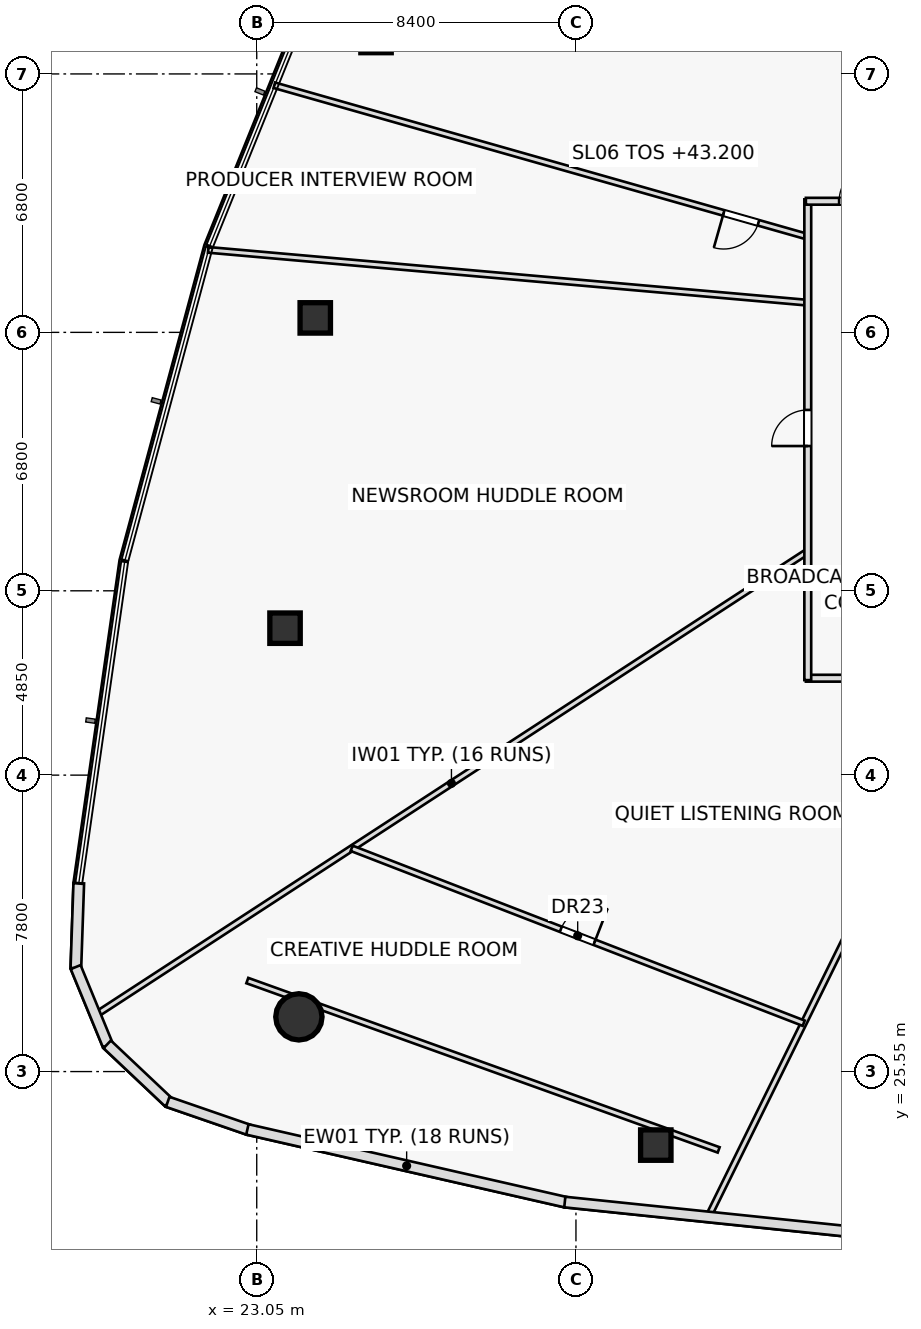
"""IFC4 building model, lengths in metres.
Left out: names, types, materials, properties, quantities, classifications, styles, units other than length and angle.
Written with IfcOpenShell. Run it as: python <this file> out.ifc"""

import sys

from ifc_helpers import new_model, si_unit, direction, frame, frame_2d, origin, origin_2d, place, context, subcontext, project, spatial, rectangle, hollow_rectangle, hollow_circle, extrude, element, fill, save


model = new_model("IFC4")
c1 = context("Model", 3, precision=1e-05, world=origin(), true_north=direction((0.0, 1.0)))
c2 = subcontext(c1, "Body", "Model", "MODEL_VIEW")
j1 = project(units=[si_unit("LENGTHUNIT", "METRE"), si_unit("PLANEANGLEUNIT", "RADIAN")], contexts=[c1])
p1 = place(None, origin())
s1 = spatial("IfcSite", under=j1, at=p1, CompositionType="ELEMENT")
p2 = place(p1, origin())
s2 = spatial("IfcBuilding", under=s1, at=p2, CompositionType="ELEMENT")
p3 = place(p2, frame((0.0, 0.0, 43.2)))
s3 = spatial("IfcBuildingStorey", under=s2, at=p3, CompositionType="ELEMENT", Elevation=43.2)
for number, where, z_axis, x_axis in (
    (1, (26.189, 52.758, 0.0), (0.0, 0.0, 1.0), (1.0, 0.0, 0.0)),
    (2, (24.59, 45.381, 0.0), (0.0, 0.0, 1.0), (1.0, 0.0, 0.0)),
    (3, (23.795, 37.216, 0.0), (0.0, 0.0, 1.0), (1.0, 0.0, 0.0)),
):
    element("IfcColumn", number, at=place(p3, frame(where, z_axis=z_axis, x_axis=x_axis)), inside=s3, PredefinedType="COLUMN", context=c2, shape_type="SweptSolid", body=[
        extrude(hollow_rectangle(XDim=0.8, YDim=0.8, WallThickness=0.045, at=origin_2d()), origin(), (0.0, 0.0, 1.0), 3.6),
    ])
p4 = place(p3, frame((24.159, 26.99, 0.0), z_axis=(0.0, 0.0, 1.0), x_axis=(1.0, 0.0, 0.0)))
e4 = element("IfcColumn", 4, at=p4, inside=s3, PredefinedType="COLUMN", context=c2, shape_type="SweptSolid", body=[
    extrude(hollow_circle(Radius=0.61, WallThickness=0.05, at=origin_2d()), origin(), (0.0, 0.0, 1.0), 3.6),
])
p5 = place(p3, frame((33.551, 23.615, 0.0), z_axis=(0.0, 0.0, 1.0), x_axis=(1.0, 0.0, 0.0)))
e5 = element("IfcColumn", 5, at=p5, inside=s3, PredefinedType="COLUMN", context=c2, shape_type="SweptSolid", body=[
    extrude(hollow_rectangle(XDim=0.8, YDim=0.8, WallThickness=0.045, at=origin_2d()), origin(), (0.0, 0.0, 1.0), 3.6),
])
p6 = place(p3, frame((22.802, 27.945, 0.0), z_axis=(0.0, 0.0, 1.0), x_axis=(0.941102349209, -0.338121824662, 0.0)))
e6 = element("IfcWall", 6, at=p6, inside=s3, PredefinedType="PARTITIONING", context=c2, shape_type="SweptSolid", body=[
    extrude(rectangle(XDim=13.18, YDim=0.15, at=frame_2d((6.59, 0.0))), origin(), (0.0, 0.0, 1.0), 2.925),
])
p7 = place(p3, frame((37.55, 47.514, 0.0), z_axis=(0.0, 0.0, 1.0), x_axis=(-0.961932608726, 0.273286765632, 0.0)))
e7 = element("IfcWall", 7, at=p7, inside=s3, PredefinedType="PARTITIONING", context=c2, shape_type="SweptSolid", body=[
    extrude(rectangle(XDim=14.593, YDim=0.15, at=frame_2d((7.296, 0.0))), origin(), (0.0, 0.0, 1.0), 2.925),
])
p8 = place(p7, frame((1.35, 0.0, 0.0)))
e8 = element("IfcOpeningElement", 8, at=p8, cuts=e7, PredefinedType="OPENING", context=c2, shape_type="SweptSolid", body=[
    extrude(rectangle(XDim=0.95, YDim=2.05, at=frame_2d((0.475, 1.025))), frame((0.0, 0.085, 0.0), z_axis=(0.0, -1.0, 0.0), x_axis=(1.0, 0.0, 0.0)), (0.0, 0.0, 1.0), 0.17),
])
p9 = place(p3, frame((37.55, 45.78, 0.0), z_axis=(0.0, 0.0, 1.0), x_axis=(-0.996136872502, 0.087814185882, 0.0)))
e9 = element("IfcWall", 9, at=p9, inside=s3, PredefinedType="PARTITIONING", context=c2, shape_type="SweptSolid", body=[
    extrude(rectangle(XDim=15.839, YDim=0.15, at=frame_2d((7.919, 0.0))), origin(), (0.0, 0.0, 1.0), 2.925),
])
p10 = place(p3, frame((37.55, 39.238, 0.0), z_axis=(0.0, 0.0, 1.0), x_axis=(-0.838030337593, -0.545623637019, 0.0)))
e10 = element("IfcWall", 10, at=p10, inside=s3, PredefinedType="PARTITIONING", context=c2, shape_type="SweptSolid", body=[
    extrude(rectangle(XDim=22.377, YDim=0.15, at=frame_2d((11.188, 0.0))), origin(), (0.0, 0.0, 1.0), 2.925),
])
p11 = place(p3, frame((41.916, 35.9, 0.0), z_axis=(0.0, 0.0, 1.0), x_axis=(-0.442006147161, -0.89701202103, 0.0)))
e11 = element("IfcWall", 11, at=p11, inside=s3, PredefinedType="PARTITIONING", context=c2, shape_type="SweptSolid", body=[
    extrude(rectangle(XDim=15.813, YDim=0.15, at=frame_2d((7.907, 0.0))), origin(), (0.0, 0.0, 1.0), 2.975),
])
p12 = place(p3, frame((25.548, 31.424, 0.0), z_axis=(0.0, 0.0, 1.0), x_axis=(0.932625879007, -0.360844800166, 0.0)))
e12 = element("IfcWall", 12, at=p12, inside=s3, PredefinedType="PARTITIONING", context=c2, shape_type="SweptSolid", body=[
    extrude(rectangle(XDim=12.754, YDim=0.15, at=frame_2d((6.377, 0.0))), origin(), (0.0, 0.0, 1.0), 2.925),
])
p13 = place(p12, frame((5.902, 0.0, 0.0)))
e13 = element("IfcOpeningElement", 13, at=p13, cuts=e12, PredefinedType="OPENING", context=c2, shape_type="SweptSolid", body=[
    extrude(rectangle(XDim=0.95, YDim=2.05, at=frame_2d((0.475, 1.025))), frame((0.0, 0.085, 0.0), z_axis=(0.0, -1.0, 0.0), x_axis=(1.0, 0.0, 0.0)), (0.0, 0.0, 1.0), 0.17),
])
p14 = place(p3, frame((59.55, 35.9, 0.0), z_axis=(0.0, 0.0, 1.0), x_axis=(-1.0, 0.0, 0.0)))
e14 = element("IfcWall", 14, at=p14, inside=s3, PredefinedType="PARTITIONING", context=c2, shape_type="SweptSolid", body=[
    extrude(rectangle(XDim=22.05, YDim=0.18, at=frame_2d((11.025, 0.0))), origin(), (0.0, 0.0, 1.0), 2.925),
])
p15 = place(p14, frame((2.193, 0.0, 0.0)))
e15 = element("IfcOpeningElement", 15, at=p15, cuts=e14, PredefinedType="OPENING", context=c2, shape_type="SweptSolid", body=[
    extrude(rectangle(XDim=0.95, YDim=2.05, at=frame_2d((0.475, 1.025))), frame((0.0, 0.1, 0.0), z_axis=(0.0, -1.0, 0.0), x_axis=(1.0, 0.0, 0.0)), (0.0, 0.0, 1.0), 0.2),
])
p16 = place(p14, frame((8.49, 0.0, 0.0)))
e16 = element("IfcOpeningElement", 16, at=p16, cuts=e14, PredefinedType="OPENING", context=c2, shape_type="SweptSolid", body=[
    extrude(rectangle(XDim=0.95, YDim=2.05, at=frame_2d((0.475, 1.025))), frame((0.0, 0.1, 0.0), z_axis=(0.0, -1.0, 0.0), x_axis=(1.0, 0.0, 0.0)), (0.0, 0.0, 1.0), 0.2),
])
p17 = place(p14, frame((14.76, 0.0, 0.0)))
e17 = element("IfcOpeningElement", 17, at=p17, cuts=e14, PredefinedType="OPENING", context=c2, shape_type="SweptSolid", body=[
    extrude(rectangle(XDim=0.95, YDim=2.05, at=frame_2d((0.475, 1.025))), frame((0.0, 0.1, 0.0), z_axis=(0.0, -1.0, 0.0), x_axis=(1.0, 0.0, 0.0)), (0.0, 0.0, 1.0), 0.2),
])
p18 = place(p14, frame((19.281, 0.0, 0.0)))
e18 = element("IfcOpeningElement", 18, at=p18, cuts=e14, PredefinedType="OPENING", context=c2, shape_type="SweptSolid", body=[
    extrude(rectangle(XDim=0.95, YDim=2.05, at=frame_2d((0.475, 1.025))), frame((0.0, 0.1, 0.0), z_axis=(0.0, -1.0, 0.0), x_axis=(1.0, 0.0, 0.0)), (0.0, 0.0, 1.0), 0.2),
])
p19 = place(p3, frame((37.55, 35.85, 0.0), z_axis=(0.0, 0.0, 1.0), x_axis=(0.0, 1.0, 0.0)))
e19 = element("IfcWall", 19, at=p19, inside=s3, PredefinedType="PARTITIONING", context=c2, shape_type="SweptSolid", body=[
    extrude(rectangle(XDim=12.65, YDim=0.18, at=frame_2d((6.325, 0.0))), origin(), (0.0, 0.0, 1.0), 2.925),
])
p20 = place(p19, frame((6.159, 0.0, 0.0)))
e20 = element("IfcOpeningElement", 20, at=p20, cuts=e19, PredefinedType="OPENING", context=c2, shape_type="SweptSolid", body=[
    extrude(rectangle(XDim=0.95, YDim=2.05, at=frame_2d((0.475, 1.025))), frame((0.0, 0.1, 0.0), z_axis=(0.0, -1.0, 0.0), x_axis=(1.0, 0.0, 0.0)), (0.0, 0.0, 1.0), 0.2),
])
p21 = place(p3, frame((37.5, 48.45, 0.0), z_axis=(0.0, 0.0, 1.0), x_axis=(1.0, 0.0, 0.0)))
e21 = element("IfcWall", 21, at=p21, inside=s3, PredefinedType="PARTITIONING", context=c2, shape_type="SweptSolid", body=[
    extrude(rectangle(XDim=2.7, YDim=0.18, at=frame_2d((1.35, 0.0))), origin(), (0.0, 0.0, 1.0), 3.6),
])
p22 = place(p21, frame((0.875, 0.0, 0.0)))
e22 = element("IfcOpeningElement", 22, at=p22, cuts=e21, PredefinedType="OPENING", context=c2, shape_type="SweptSolid", body=[
    extrude(rectangle(XDim=0.95, YDim=2.05, at=frame_2d((0.475, 1.025))), frame((0.0, 0.1, 0.0), z_axis=(0.0, -1.0, 0.0), x_axis=(1.0, 0.0, 0.0)), (0.0, 0.0, 1.0), 0.2),
])
p23 = place(p3, frame((18.367, 30.506, 0.0), z_axis=(0.0, 0.0, 1.0), x_axis=(-0.033947220184, -0.999423627018, 0.0)))
e23 = element("IfcWall", 23, at=p23, inside=s3, PredefinedType="STANDARD", context=c2, shape_type="SweptSolid", body=[
    extrude(rectangle(XDim=2.237, YDim=0.28, at=frame_2d((1.118, 0.0))), origin(), (0.0, 0.0, 1.0), 3.6),
])
p24 = place(p3, frame((18.286, 28.299, 0.0), z_axis=(0.0, 0.0, 1.0), x_axis=(0.380302749829, -0.924862053753, 0.0)))
e24 = element("IfcWall", 24, at=p24, inside=s3, PredefinedType="STANDARD", context=c2, shape_type="SweptSolid", body=[
    extrude(rectangle(XDim=2.225, YDim=0.28, at=frame_2d((1.113, 0.0))), origin(), (0.0, 0.0, 1.0), 3.6),
])
p25 = place(p3, frame((19.115, 26.265, 0.0), z_axis=(0.0, 0.0, 1.0), x_axis=(0.72716832858, -0.68645919173, 0.0)))
e25 = element("IfcWall", 25, at=p25, inside=s3, PredefinedType="STANDARD", context=c2, shape_type="SweptSolid", body=[
    extrude(rectangle(XDim=2.225, YDim=0.28, at=frame_2d((1.112, 0.0))), origin(), (0.0, 0.0, 1.0), 3.6),
])
p26 = place(p3, frame((20.708, 24.753, 0.0), z_axis=(0.0, 0.0, 1.0), x_axis=(0.945228598379, -0.326409094246, 0.0)))
e26 = element("IfcWall", 26, at=p26, inside=s3, PredefinedType="STANDARD", context=c2, shape_type="SweptSolid", body=[
    extrude(rectangle(XDim=2.248, YDim=0.28, at=frame_2d((1.124, 0.0))), origin(), (0.0, 0.0, 1.0), 3.6),
])
p27 = place(p3, frame((22.804, 24.028, 0.0), z_axis=(0.0, 0.0, 1.0), x_axis=(0.974855686906, -0.222837137181, 0.0)))
e27 = element("IfcWall", 27, at=p27, inside=s3, PredefinedType="STANDARD", context=c2, shape_type="SweptSolid", body=[
    extrude(rectangle(XDim=8.598, YDim=0.28, at=frame_2d((4.299, 0.0))), origin(), (0.0, 0.0, 1.0), 3.6),
])
p28 = place(p3, frame((31.156, 22.117, 0.0), z_axis=(0.0, 0.0, 1.0), x_axis=(0.994656310242, -0.103241583171, 0.0)))
e28 = element("IfcWall", 28, at=p28, inside=s3, PredefinedType="STANDARD", context=c2, shape_type="SweptSolid", body=[
    extrude(rectangle(XDim=8.586, YDim=0.28, at=frame_2d((4.293, 0.0))), origin(), (0.0, 0.0, 1.0), 3.6),
])
p29 = place(p8, origin())
e29 = element("IfcDoor", 29, at=p29, inside=s3, OperationType="SINGLE_SWING_RIGHT", PredefinedType="DOOR", context=c2, shape_type="SweptSolid", body=[
    extrude(rectangle(XDim=0.95, YDim=2.05, at=frame_2d((0.475, 1.025))), frame((0.0, 0.025, 0.0), z_axis=(0.0, -1.0, 0.0), x_axis=(1.0, 0.0, 0.0)), (0.0, 0.0, 1.0), 0.05),
])
fill(e8, e29)
p30 = place(p13, origin())
e30 = element("IfcDoor", 30, at=p30, inside=s3, OperationType="SINGLE_SWING_RIGHT", PredefinedType="DOOR", context=c2, shape_type="SweptSolid", body=[
    extrude(rectangle(XDim=0.95, YDim=2.05, at=frame_2d((0.475, 1.025))), frame((0.0, 0.025, 0.0), z_axis=(0.0, -1.0, 0.0), x_axis=(1.0, 0.0, 0.0)), (0.0, 0.0, 1.0), 0.05),
])
fill(e13, e30)
p31 = place(p20, origin())
e31 = element("IfcDoor", 31, at=p31, inside=s3, OperationType="SINGLE_SWING_LEFT", PredefinedType="DOOR", context=c2, shape_type="SweptSolid", body=[
    extrude(rectangle(XDim=0.95, YDim=2.05, at=frame_2d((0.475, 1.025))), frame((0.0, 0.025, 0.0), z_axis=(0.0, -1.0, 0.0), x_axis=(1.0, 0.0, 0.0)), (0.0, 0.0, 1.0), 0.05),
])
fill(e20, e31)
p32 = place(p22, origin())
e32 = element("IfcDoor", 32, at=p32, inside=s3, OperationType="SINGLE_SWING_RIGHT", PredefinedType="DOOR", context=c2, shape_type="SweptSolid", body=[
    extrude(rectangle(XDim=0.95, YDim=2.05, at=frame_2d((0.475, 1.025))), frame((0.0, 0.025, 0.0), z_axis=(0.0, -1.0, 0.0), x_axis=(1.0, 0.0, 0.0)), (0.0, 0.0, 1.0), 0.05),
])
fill(e22, e32)
save(model, sys.argv[1])
